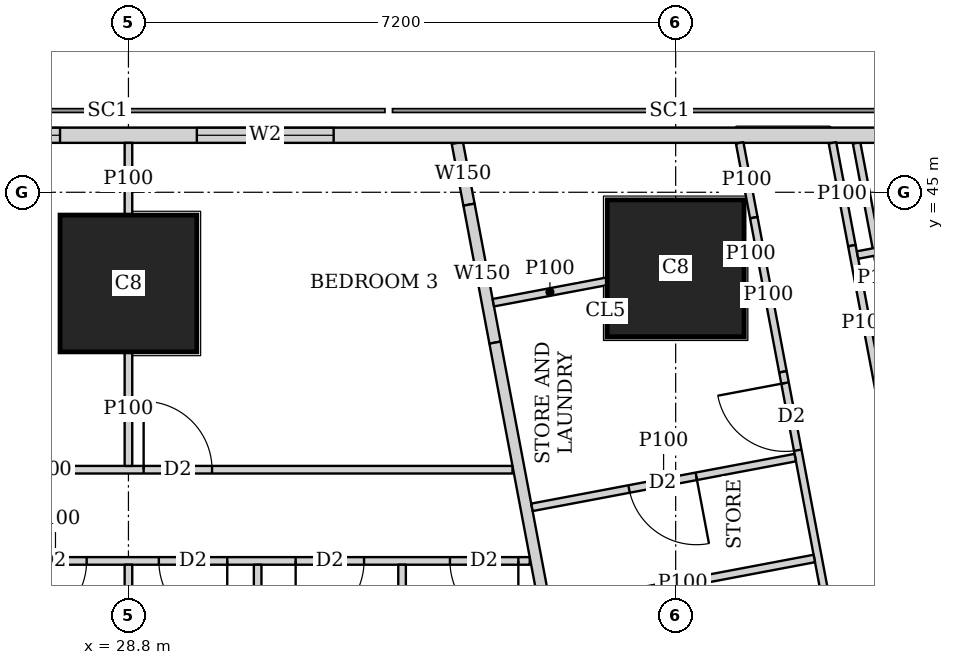
"""IFC4 building model, lengths in metres.
Left out: names, types, materials, properties, quantities, classifications, styles, units other than length and angle.
Written with IfcOpenShell. Run it as: python <this file> out.ifc"""

import sys

from ifc_helpers import new_model, si_unit, direction, frame, frame_2d, origin, origin_2d, place, context, subcontext, project, spatial, rectangle, extrude, element, fill, save


model = new_model("IFC4")
c1 = context("Model", 3, precision=1e-05, world=origin(), true_north=direction((0.0, 1.0)))
c2 = subcontext(c1, "Body", "Model", "MODEL_VIEW")
j1 = project(units=[si_unit("LENGTHUNIT", "METRE"), si_unit("PLANEANGLEUNIT", "RADIAN")], contexts=[c1])
p1 = place(None, origin())
s1 = spatial("IfcSite", under=j1, at=p1, CompositionType="ELEMENT")
p2 = place(p1, origin())
s2 = spatial("IfcBuilding", under=s1, at=p2, CompositionType="ELEMENT")
p3 = place(p2, frame((0.0, 0.0, 139.55)))
s3 = spatial("IfcBuildingStorey", under=s2, at=p3, CompositionType="ELEMENT", Elevation=139.55)
for number, where, z_axis, x_axis in (
    (1, (28.8, 43.8, 0.0), (0.0, 0.0, 1.0), (1.0, 0.0, 0.0)),
    (2, (36.0, 44.0, 0.0), (0.0, 0.0, 1.0), (1.0, 0.0, 0.0)),
):
    element("IfcColumn", number, at=place(p3, frame(where, z_axis=z_axis, x_axis=x_axis)), inside=s3, PredefinedType="COLUMN", context=c2, shape_type="SweptSolid", body=[
        extrude(rectangle(XDim=1.8, YDim=1.8, at=origin_2d()), origin(), (0.0, 0.0, 1.0), 3.75),
    ])
p4 = place(p3, frame((40.106, 45.75, 0.0), z_axis=(0.0, 0.0, 1.0), x_axis=(-1.0, 0.0, 0.0)))
e3 = element("IfcWall", 3, at=p4, inside=s3, PredefinedType="SOLIDWALL", context=c2, shape_type="SweptSolid", body=[
    extrude(rectangle(XDim=37.943, YDim=0.2, at=frame_2d((18.971, 0.0))), origin(), (0.0, 0.0, 1.0), 3.5),
])
p5 = place(p4, frame((8.606, 0.0, 0.9)))
e4 = element("IfcOpeningElement", 4, at=p5, cuts=e3, PredefinedType="OPENING", context=c2, shape_type="SweptSolid", body=[
    extrude(rectangle(XDim=1.8, YDim=1.5, at=frame_2d((0.9, 0.75))), frame((0.0, 0.11, 0.0), z_axis=(0.0, -1.0, 0.0), x_axis=(1.0, 0.0, 0.0)), (0.0, 0.0, 1.0), 0.22),
])
p6 = place(p4, frame((12.206, 0.0, 0.9)))
e5 = element("IfcOpeningElement", 5, at=p6, cuts=e3, PredefinedType="OPENING", context=c2, shape_type="SweptSolid", body=[
    extrude(rectangle(XDim=1.8, YDim=1.5, at=frame_2d((0.9, 0.75))), frame((0.0, 0.11, 0.0), z_axis=(0.0, -1.0, 0.0), x_axis=(1.0, 0.0, 0.0)), (0.0, 0.0, 1.0), 0.22),
])
p7 = place(p4, frame((15.806, 0.0, 0.9)))
e6 = element("IfcOpeningElement", 6, at=p7, cuts=e3, PredefinedType="OPENING", context=c2, shape_type="SweptSolid", body=[
    extrude(rectangle(XDim=1.8, YDim=1.5, at=frame_2d((0.9, 0.75))), frame((0.0, 0.11, 0.0), z_axis=(0.0, -1.0, 0.0), x_axis=(1.0, 0.0, 0.0)), (0.0, 0.0, 1.0), 0.22),
])
p8 = place(p4, frame((19.406, 0.0, 0.9)))
e7 = element("IfcOpeningElement", 7, at=p8, cuts=e3, PredefinedType="OPENING", context=c2, shape_type="SweptSolid", body=[
    extrude(rectangle(XDim=1.8, YDim=1.5, at=frame_2d((0.9, 0.75))), frame((0.0, 0.11, 0.0), z_axis=(0.0, -1.0, 0.0), x_axis=(1.0, 0.0, 0.0)), (0.0, 0.0, 1.0), 0.22),
])
p9 = place(p4, frame((23.006, 0.0, 0.9)))
e8 = element("IfcOpeningElement", 8, at=p9, cuts=e3, PredefinedType="OPENING", context=c2, shape_type="SweptSolid", body=[
    extrude(rectangle(XDim=1.8, YDim=1.5, at=frame_2d((0.9, 0.75))), frame((0.0, 0.11, 0.0), z_axis=(0.0, -1.0, 0.0), x_axis=(1.0, 0.0, 0.0)), (0.0, 0.0, 1.0), 0.22),
])
p10 = place(p4, frame((26.606, 0.0, 0.9)))
e9 = element("IfcOpeningElement", 9, at=p10, cuts=e3, PredefinedType="OPENING", context=c2, shape_type="SweptSolid", body=[
    extrude(rectangle(XDim=1.8, YDim=1.5, at=frame_2d((0.9, 0.75))), frame((0.0, 0.11, 0.0), z_axis=(0.0, -1.0, 0.0), x_axis=(1.0, 0.0, 0.0)), (0.0, 0.0, 1.0), 0.22),
])
p11 = place(p3, frame((33.127, 45.65, 0.0), z_axis=(0.0, 0.0, 1.0), x_axis=(0.186176514576, -0.982516313056, 0.0)))
e10 = element("IfcWall", 10, at=p11, inside=s3, PredefinedType="SOLIDWALL", context=c2, shape_type="SweptSolid", body=[
    extrude(rectangle(XDim=0.827, YDim=0.15, at=frame_2d((0.414, 0.0))), origin(), (0.0, 0.0, 1.0), 3.5),
])
p12 = place(p3, frame((33.281, 44.837, 0.0), z_axis=(0.0, 0.0, 1.0), x_axis=(0.185198323004, -0.982701165745, 0.0)))
e11 = element("IfcWall", 11, at=p12, inside=s3, PredefinedType="SOLIDWALL", context=c2, shape_type="SweptSolid", body=[
    extrude(rectangle(XDim=1.847, YDim=0.15, at=frame_2d((0.923, 0.0))), origin(), (0.0, 0.0, 1.0), 2.1),
])
p13 = place(p3, frame((33.623, 43.022, 0.0), z_axis=(0.0, 0.0, 1.0), x_axis=(0.185596841028, -0.98262597798, 0.0)))
e12 = element("IfcWall", 12, at=p13, inside=s3, PredefinedType="SOLIDWALL", context=c2, shape_type="SweptSolid", body=[
    extrude(rectangle(XDim=41.66, YDim=0.15, at=frame_2d((20.83, 0.0))), origin(), (0.0, 0.0, 1.0), 2.5),
])
p14 = place(p13, frame((20.242, 0.0, 0.0)))
e13 = element("IfcOpeningElement", 13, at=p14, cuts=e12, PredefinedType="OPENING", context=c2, shape_type="SweptSolid", body=[
    extrude(rectangle(XDim=1.0, YDim=2.1, at=frame_2d((0.5, 1.05))), frame((0.0, 0.085, 0.0), z_axis=(0.0, -1.0, 0.0), x_axis=(1.0, 0.0, 0.0)), (0.0, 0.0, 1.0), 0.17),
])
p15 = place(p13, frame((24.714, 0.0, 0.0)))
e14 = element("IfcOpeningElement", 14, at=p15, cuts=e12, PredefinedType="OPENING", context=c2, shape_type="SweptSolid", body=[
    extrude(rectangle(XDim=1.0, YDim=2.1, at=frame_2d((0.5, 1.05))), frame((0.0, 0.085, 0.0), z_axis=(0.0, -1.0, 0.0), x_axis=(1.0, 0.0, 0.0)), (0.0, 0.0, 1.0), 0.17),
])
p16 = place(p13, frame((31.206, 0.0, 0.0)))
e15 = element("IfcOpeningElement", 15, at=p16, cuts=e12, PredefinedType="OPENING", context=c2, shape_type="SweptSolid", body=[
    extrude(rectangle(XDim=1.0, YDim=2.1, at=frame_2d((0.5, 1.05))), frame((0.0, 0.085, 0.0), z_axis=(0.0, -1.0, 0.0), x_axis=(1.0, 0.0, 0.0)), (0.0, 0.0, 1.0), 0.17),
])
p17 = place(p3, frame((39.054, 42.085, 0.0), z_axis=(0.0, 0.0, 1.0), x_axis=(-0.185791584218, 0.982589175207, 0.0)))
e16 = element("IfcWall", 16, at=p17, inside=s3, PredefinedType="PARTITIONING", context=c2, shape_type="SweptSolid", body=[
    extrude(rectangle(XDim=3.628, YDim=0.1, at=frame_2d((1.814, 0.0))), origin(), (0.0, 0.0, 1.0), 2.1),
])
p18 = place(p3, frame((38.063, 45.65, 0.0), z_axis=(0.0, 0.0, 1.0), x_axis=(0.185456359766, -0.982652501458, 0.0)))
e17 = element("IfcWall", 17, at=p18, inside=s3, PredefinedType="PARTITIONING", context=c2, shape_type="SweptSolid", body=[
    extrude(rectangle(XDim=1.376, YDim=0.1, at=frame_2d((0.688, 0.0))), origin(), (0.0, 0.0, 1.0), 3.5),
])
p19 = place(p3, frame((38.318, 44.298, 0.0), z_axis=(0.0, 0.0, 1.0), x_axis=(0.185481135188, -0.982647825261, 0.0)))
e18 = element("IfcWall", 18, at=p19, inside=s3, PredefinedType="PARTITIONING", context=c2, shape_type="SweptSolid", body=[
    extrude(rectangle(XDim=2.064, YDim=0.1, at=frame_2d((1.032, 0.0))), origin(), (0.0, 0.0, 1.0), 2.1),
])
p20 = place(p3, frame((36.842, 45.65, 0.0), z_axis=(0.0, 0.0, 1.0), x_axis=(0.185789875365, -0.982589498322, 0.0)))
e19 = element("IfcWall", 19, at=p20, inside=s3, PredefinedType="PARTITIONING", context=c2, shape_type="SweptSolid", body=[
    extrude(rectangle(XDim=1.001, YDim=0.1, at=frame_2d((0.5, 0.0))), origin(), (0.0, 0.0, 1.0), 3.5),
])
p21 = place(p3, frame((37.028, 44.666, 0.0), z_axis=(0.0, 0.0, 1.0), x_axis=(0.185481135188, -0.982647825261, 0.0)))
e20 = element("IfcWall", 20, at=p21, inside=s3, PredefinedType="PARTITIONING", context=c2, shape_type="SweptSolid", body=[
    extrude(rectangle(XDim=2.064, YDim=0.1, at=frame_2d((1.032, 0.0))), origin(), (0.0, 0.0, 1.0), 2.1),
])
p22 = place(p3, frame((37.411, 42.638, 0.0), z_axis=(0.0, 0.0, 1.0), x_axis=(0.185555586706, -0.982633769134, 0.0)))
e21 = element("IfcWall", 21, at=p22, inside=s3, PredefinedType="PARTITIONING", context=c2, shape_type="SweptSolid", body=[
    extrude(rectangle(XDim=17.704, YDim=0.1, at=frame_2d((8.852, 0.0))), origin(), (0.0, 0.0, 1.0), 2.5),
])
p23 = place(p22, frame((16.28, 0.0, 0.0)))
e22 = element("IfcOpeningElement", 22, at=p23, cuts=e21, PredefinedType="OPENING", context=c2, shape_type="SweptSolid", body=[
    extrude(rectangle(XDim=0.9, YDim=2.1, at=frame_2d((0.45, 1.05))), frame((0.0, 0.06, 0.0), z_axis=(0.0, -1.0, 0.0), x_axis=(1.0, 0.0, 0.0)), (0.0, 0.0, 1.0), 0.12),
])
p24 = place(p22, frame((12.688, 0.0, 0.0)))
e23 = element("IfcOpeningElement", 23, at=p24, cuts=e21, PredefinedType="OPENING", context=c2, shape_type="SweptSolid", body=[
    extrude(rectangle(XDim=0.9, YDim=2.1, at=frame_2d((0.45, 1.05))), frame((0.0, 0.06, 0.0), z_axis=(0.0, -1.0, 0.0), x_axis=(1.0, 0.0, 0.0)), (0.0, 0.0, 1.0), 0.12),
])
p25 = place(p22, frame((8.822, 0.0, 0.0)))
e24 = element("IfcOpeningElement", 24, at=p25, cuts=e21, PredefinedType="OPENING", context=c2, shape_type="SweptSolid", body=[
    extrude(rectangle(XDim=0.9, YDim=2.1, at=frame_2d((0.45, 1.05))), frame((0.0, 0.06, 0.0), z_axis=(0.0, -1.0, 0.0), x_axis=(1.0, 0.0, 0.0)), (0.0, 0.0, 1.0), 0.12),
])
p26 = place(p22, frame((3.188, 0.0, 0.0)))
e25 = element("IfcOpeningElement", 25, at=p26, cuts=e21, PredefinedType="OPENING", context=c2, shape_type="SweptSolid", body=[
    extrude(rectangle(XDim=0.9, YDim=2.1, at=frame_2d((0.45, 1.05))), frame((0.0, 0.06, 0.0), z_axis=(0.0, -1.0, 0.0), x_axis=(1.0, 0.0, 0.0)), (0.0, 0.0, 1.0), 0.12),
])
p27 = place(p22, frame((0.15, 0.0, 0.0)))
e26 = element("IfcOpeningElement", 26, at=p27, cuts=e21, PredefinedType="OPENING", context=c2, shape_type="SweptSolid", body=[
    extrude(rectangle(XDim=0.9, YDim=2.1, at=frame_2d((0.45, 1.05))), frame((0.0, 0.06, 0.0), z_axis=(0.0, -1.0, 0.0), x_axis=(1.0, 0.0, 0.0)), (0.0, 0.0, 1.0), 0.12),
])
p28 = place(p22, frame((14.371, 0.0, 0.0)))
e27 = element("IfcOpeningElement", 27, at=p28, cuts=e21, PredefinedType="OPENING", context=c2, shape_type="SweptSolid", body=[
    extrude(rectangle(XDim=0.9, YDim=2.1, at=frame_2d((0.45, 1.05))), frame((0.0, 0.06, 0.0), z_axis=(0.0, -1.0, 0.0), x_axis=(1.0, 0.0, 0.0)), (0.0, 0.0, 1.0), 0.12),
])
p29 = place(p22, frame((10.78, 0.0, 0.0)))
e28 = element("IfcOpeningElement", 28, at=p29, cuts=e21, PredefinedType="OPENING", context=c2, shape_type="SweptSolid", body=[
    extrude(rectangle(XDim=0.9, YDim=2.1, at=frame_2d((0.45, 1.05))), frame((0.0, 0.06, 0.0), z_axis=(0.0, -1.0, 0.0), x_axis=(1.0, 0.0, 0.0)), (0.0, 0.0, 1.0), 0.12),
])
p30 = place(p22, frame((6.154, 0.0, 0.0)))
e29 = element("IfcOpeningElement", 29, at=p30, cuts=e21, PredefinedType="OPENING", context=c2, shape_type="SweptSolid", body=[
    extrude(rectangle(XDim=0.9, YDim=2.1, at=frame_2d((0.45, 1.05))), frame((0.0, 0.06, 0.0), z_axis=(0.0, -1.0, 0.0), x_axis=(1.0, 0.0, 0.0)), (0.0, 0.0, 1.0), 0.12),
])
p31 = place(p3, frame((41.968, 44.85, 0.0), z_axis=(0.0, 0.0, 1.0), x_axis=(-0.98258614234, -0.185807623311, 0.0)))
e30 = element("IfcWall", 30, at=p31, inside=s3, PredefinedType="PARTITIONING", context=c2, shape_type="SweptSolid", body=[
    extrude(rectangle(XDim=3.638, YDim=0.1, at=frame_2d((1.819, 0.0))), origin(), (0.0, 0.0, 1.0), 2.1),
])
p32 = place(p3, frame((37.065, 44.201, 0.0), z_axis=(0.0, 0.0, 1.0), x_axis=(-0.983168876381, -0.182699098288, 0.0)))
e31 = element("IfcWall", 31, at=p32, inside=s3, PredefinedType="PARTITIONING", context=c2, shape_type="SweptSolid", body=[
    extrude(rectangle(XDim=0.158, YDim=0.1, at=frame_2d((0.079, 0.0))), origin(), (0.0, 0.0, 1.0), 2.1),
])
p33 = place(p3, frame((35.09, 43.828, 0.0), z_axis=(0.0, 0.0, 1.0), x_axis=(-0.982683801717, -0.185290436461, 0.0)))
e32 = element("IfcWall", 32, at=p33, inside=s3, PredefinedType="PARTITIONING", context=c2, shape_type="SweptSolid", body=[
    extrude(rectangle(XDim=1.515, YDim=0.1, at=frame_2d((0.758, 0.0))), origin(), (0.0, 0.0, 1.0), 2.1),
])
p34 = place(p3, frame((37.824, 40.182, 0.0), z_axis=(0.0, 0.0, 1.0), x_axis=(-0.982648794755, -0.185475998897, 0.0)))
e33 = element("IfcWall", 33, at=p34, inside=s3, PredefinedType="PARTITIONING", context=c2, shape_type="SweptSolid", body=[
    extrude(rectangle(XDim=3.525, YDim=0.1, at=frame_2d((1.763, 0.0))), origin(), (0.0, 0.0, 1.0), 3.5),
])
p35 = place(p3, frame((21.6, 41.35, 0.0), z_axis=(0.0, 0.0, 1.0), x_axis=(1.0, 0.0, 0.0)))
e34 = element("IfcWall", 34, at=p35, inside=s3, PredefinedType="PARTITIONING", context=c2, shape_type="SweptSolid", body=[
    extrude(rectangle(XDim=12.253, YDim=0.1, at=frame_2d((6.126, 0.0))), origin(), (0.0, 0.0, 1.0), 3.5),
])
p36 = place(p35, frame((0.2, 0.0, 0.0)))
e35 = element("IfcOpeningElement", 35, at=p36, cuts=e34, PredefinedType="OPENING", context=c2, shape_type="SweptSolid", body=[
    extrude(rectangle(XDim=0.9, YDim=2.1, at=frame_2d((0.45, 1.05))), frame((0.0, 0.06, 0.0), z_axis=(0.0, -1.0, 0.0), x_axis=(1.0, 0.0, 0.0)), (0.0, 0.0, 1.0), 0.12),
])
p37 = place(p35, frame((3.8, 0.0, 0.0)))
e36 = element("IfcOpeningElement", 36, at=p37, cuts=e34, PredefinedType="OPENING", context=c2, shape_type="SweptSolid", body=[
    extrude(rectangle(XDim=0.9, YDim=2.1, at=frame_2d((0.45, 1.05))), frame((0.0, 0.06, 0.0), z_axis=(0.0, -1.0, 0.0), x_axis=(1.0, 0.0, 0.0)), (0.0, 0.0, 1.0), 0.12),
])
p38 = place(p35, frame((7.4, 0.0, 0.0)))
e37 = element("IfcOpeningElement", 37, at=p38, cuts=e34, PredefinedType="OPENING", context=c2, shape_type="SweptSolid", body=[
    extrude(rectangle(XDim=0.9, YDim=2.1, at=frame_2d((0.45, 1.05))), frame((0.0, 0.06, 0.0), z_axis=(0.0, -1.0, 0.0), x_axis=(1.0, 0.0, 0.0)), (0.0, 0.0, 1.0), 0.12),
])
p39 = place(p3, frame((21.6, 40.15, 0.0), z_axis=(0.0, 0.0, 1.0), x_axis=(1.0, 0.0, 0.0)))
e38 = element("IfcWall", 38, at=p39, inside=s3, PredefinedType="PARTITIONING", context=c2, shape_type="SweptSolid", body=[
    extrude(rectangle(XDim=12.48, YDim=0.1, at=frame_2d((6.24, 0.0))), origin(), (0.0, 0.0, 1.0), 3.5),
])
p40 = place(p39, frame((0.575, 0.0, 0.0)))
e39 = element("IfcOpeningElement", 39, at=p40, cuts=e38, PredefinedType="OPENING", context=c2, shape_type="SweptSolid", body=[
    extrude(rectangle(XDim=0.9, YDim=2.1, at=frame_2d((0.45, 1.05))), frame((0.0, 0.06, 0.0), z_axis=(0.0, -1.0, 0.0), x_axis=(1.0, 0.0, 0.0)), (0.0, 0.0, 1.0), 0.12),
])
p41 = place(p39, frame((3.95, 0.0, 0.0)))
e40 = element("IfcOpeningElement", 40, at=p41, cuts=e38, PredefinedType="OPENING", context=c2, shape_type="SweptSolid", body=[
    extrude(rectangle(XDim=0.9, YDim=2.1, at=frame_2d((0.45, 1.05))), frame((0.0, 0.06, 0.0), z_axis=(0.0, -1.0, 0.0), x_axis=(1.0, 0.0, 0.0)), (0.0, 0.0, 1.0), 0.12),
])
p42 = place(p39, frame((7.6, 0.0, 0.0)))
e41 = element("IfcOpeningElement", 41, at=p42, cuts=e38, PredefinedType="OPENING", context=c2, shape_type="SweptSolid", body=[
    extrude(rectangle(XDim=0.9, YDim=2.1, at=frame_2d((0.45, 1.05))), frame((0.0, 0.06, 0.0), z_axis=(0.0, -1.0, 0.0), x_axis=(1.0, 0.0, 0.0)), (0.0, 0.0, 1.0), 0.12),
])
p43 = place(p39, frame((11.43, 0.0, 0.0)))
e42 = element("IfcOpeningElement", 42, at=p43, cuts=e38, PredefinedType="OPENING", context=c2, shape_type="SweptSolid", body=[
    extrude(rectangle(XDim=0.9, YDim=2.1, at=frame_2d((0.45, 1.05))), frame((0.0, 0.06, 0.0), z_axis=(0.0, -1.0, 0.0), x_axis=(1.0, 0.0, 0.0)), (0.0, 0.0, 1.0), 0.12),
])
p44 = place(p39, frame((2.375, 0.0, 0.0)))
e43 = element("IfcOpeningElement", 43, at=p44, cuts=e38, PredefinedType="OPENING", context=c2, shape_type="SweptSolid", body=[
    extrude(rectangle(XDim=0.9, YDim=2.1, at=frame_2d((0.45, 1.05))), frame((0.0, 0.06, 0.0), z_axis=(0.0, -1.0, 0.0), x_axis=(1.0, 0.0, 0.0)), (0.0, 0.0, 1.0), 0.12),
])
p45 = place(p39, frame((5.75, 0.0, 0.0)))
e44 = element("IfcOpeningElement", 44, at=p45, cuts=e38, PredefinedType="OPENING", context=c2, shape_type="SweptSolid", body=[
    extrude(rectangle(XDim=0.9, YDim=2.1, at=frame_2d((0.45, 1.05))), frame((0.0, 0.06, 0.0), z_axis=(0.0, -1.0, 0.0), x_axis=(1.0, 0.0, 0.0)), (0.0, 0.0, 1.0), 0.12),
])
p46 = place(p39, frame((9.4, 0.0, 0.0)))
e45 = element("IfcOpeningElement", 45, at=p46, cuts=e38, PredefinedType="OPENING", context=c2, shape_type="SweptSolid", body=[
    extrude(rectangle(XDim=0.9, YDim=2.1, at=frame_2d((0.45, 1.05))), frame((0.0, 0.06, 0.0), z_axis=(0.0, -1.0, 0.0), x_axis=(1.0, 0.0, 0.0)), (0.0, 0.0, 1.0), 0.12),
])
p47 = place(p3, frame((28.8, 41.4, 0.0), z_axis=(0.0, 0.0, 1.0), x_axis=(0.0, 1.0, 0.0)))
e46 = element("IfcWall", 46, at=p47, inside=s3, PredefinedType="PARTITIONING", context=c2, shape_type="SweptSolid", body=[
    extrude(rectangle(XDim=1.499, YDim=0.1, at=frame_2d((0.75, 0.0))), origin(), (0.0, 0.0, 1.0), 3.5),
])
p48 = place(p3, frame((28.8, 44.701, 0.0), z_axis=(0.0, 0.0, 1.0), x_axis=(0.0, 1.0, 0.0)))
e47 = element("IfcWall", 47, at=p48, inside=s3, PredefinedType="PARTITIONING", context=c2, shape_type="SweptSolid", body=[
    extrude(rectangle(XDim=0.949, YDim=0.1, at=frame_2d((0.475, 0.0))), origin(), (0.0, 0.0, 1.0), 3.5),
])
p49 = place(p3, frame((28.8, 38.251, 0.0), z_axis=(0.0, 0.0, 1.0), x_axis=(0.0, 1.0, 0.0)))
e48 = element("IfcWall", 48, at=p49, inside=s3, PredefinedType="PARTITIONING", context=c2, shape_type="SweptSolid", body=[
    extrude(rectangle(XDim=1.849, YDim=0.1, at=frame_2d((0.925, 0.0))), origin(), (0.0, 0.0, 1.0), 3.5),
])
for number, where, z_axis, x_axis in (
    (49, (32.4, 36.575, 0.0), (0.0, 0.0, 1.0), (0.0, 1.0, 0.0)),
    (50, (30.5, 36.575, 0.0), (0.0, 0.0, 1.0), (0.0, 1.0, 0.0)),
):
    element("IfcWall", number, at=place(p3, frame(where, z_axis=z_axis, x_axis=x_axis)), inside=s3, PredefinedType="PARTITIONING", context=c2, shape_type="SweptSolid", body=[
        extrude(rectangle(XDim=3.525, YDim=0.1, at=frame_2d((1.763, 0.0))), origin(), (0.0, 0.0, 1.0), 3.5),
    ])
p50 = place(p3, frame((37.573, 41.509, 0.0), z_axis=(0.0, 0.0, 1.0), x_axis=(-0.982638553676, -0.185530247748, 0.0)))
e51 = element("IfcWall", 51, at=p50, inside=s3, PredefinedType="PARTITIONING", context=c2, shape_type="SweptSolid", body=[
    extrude(rectangle(XDim=3.525, YDim=0.1, at=frame_2d((1.763, 0.0))), origin(), (0.0, 0.0, 1.0), 3.5),
])
p51 = place(p50, frame((1.325, 0.0, 0.0)))
e52 = element("IfcOpeningElement", 52, at=p51, cuts=e51, PredefinedType="OPENING", context=c2, shape_type="SweptSolid", body=[
    extrude(rectangle(XDim=0.9, YDim=2.1, at=frame_2d((0.45, 1.05))), frame((0.0, 0.06, 0.0), z_axis=(0.0, -1.0, 0.0), x_axis=(1.0, 0.0, 0.0)), (0.0, 0.0, 1.0), 0.12),
])
p52 = place(p5, origin())
e53 = element("IfcWindow", 53, at=p52, inside=s3, PartitioningType="SINGLE_PANEL", PredefinedType="WINDOW", context=c2, shape_type="SweptSolid", body=[
    extrude(rectangle(XDim=1.8, YDim=1.5, at=frame_2d((0.9, 0.75))), frame((0.0, 0.03, 0.0), z_axis=(0.0, -1.0, 0.0), x_axis=(1.0, 0.0, 0.0)), (0.0, 0.0, 1.0), 0.06),
])
fill(e4, e53)
p53 = place(p6, origin())
e54 = element("IfcWindow", 54, at=p53, inside=s3, PartitioningType="SINGLE_PANEL", PredefinedType="WINDOW", context=c2, shape_type="SweptSolid", body=[
    extrude(rectangle(XDim=1.8, YDim=1.5, at=frame_2d((0.9, 0.75))), frame((0.0, 0.03, 0.0), z_axis=(0.0, -1.0, 0.0), x_axis=(1.0, 0.0, 0.0)), (0.0, 0.0, 1.0), 0.06),
])
fill(e5, e54)
p54 = place(p27, origin())
e55 = element("IfcDoor", 55, at=p54, inside=s3, OperationType="SINGLE_SWING_RIGHT", PredefinedType="DOOR", context=c2, shape_type="SweptSolid", body=[
    extrude(rectangle(XDim=0.9, YDim=2.1, at=frame_2d((0.45, 1.05))), frame((0.0, 0.025, 0.0), z_axis=(0.0, -1.0, 0.0), x_axis=(1.0, 0.0, 0.0)), (0.0, 0.0, 1.0), 0.05),
])
fill(e26, e55)
p55 = place(p38, origin())
e56 = element("IfcDoor", 56, at=p55, inside=s3, OperationType="SINGLE_SWING_LEFT", PredefinedType="DOOR", context=c2, shape_type="SweptSolid", body=[
    extrude(rectangle(XDim=0.9, YDim=2.1, at=frame_2d((0.45, 1.05))), frame((0.0, 0.025, 0.0), z_axis=(0.0, -1.0, 0.0), x_axis=(1.0, 0.0, 0.0)), (0.0, 0.0, 1.0), 0.05),
])
fill(e37, e56)
p56 = place(p42, origin())
e57 = element("IfcDoor", 57, at=p56, inside=s3, OperationType="SINGLE_SWING_LEFT", PredefinedType="DOOR", context=c2, shape_type="SweptSolid", body=[
    extrude(rectangle(XDim=0.9, YDim=2.1, at=frame_2d((0.45, 1.05))), frame((0.0, 0.025, 0.0), z_axis=(0.0, -1.0, 0.0), x_axis=(1.0, 0.0, 0.0)), (0.0, 0.0, 1.0), 0.05),
])
fill(e41, e57)
p57 = place(p43, origin())
e58 = element("IfcDoor", 58, at=p57, inside=s3, OperationType="SINGLE_SWING_LEFT", PredefinedType="DOOR", context=c2, shape_type="SweptSolid", body=[
    extrude(rectangle(XDim=0.9, YDim=2.1, at=frame_2d((0.45, 1.05))), frame((0.0, 0.025, 0.0), z_axis=(0.0, -1.0, 0.0), x_axis=(1.0, 0.0, 0.0)), (0.0, 0.0, 1.0), 0.05),
])
fill(e42, e58)
p58 = place(p45, origin())
e59 = element("IfcDoor", 59, at=p58, inside=s3, OperationType="SINGLE_SWING_RIGHT", PredefinedType="DOOR", context=c2, shape_type="SweptSolid", body=[
    extrude(rectangle(XDim=0.9, YDim=2.1, at=frame_2d((0.45, 1.05))), frame((0.0, 0.025, 0.0), z_axis=(0.0, -1.0, 0.0), x_axis=(1.0, 0.0, 0.0)), (0.0, 0.0, 1.0), 0.05),
])
fill(e44, e59)
p59 = place(p46, origin())
e60 = element("IfcDoor", 60, at=p59, inside=s3, OperationType="SINGLE_SWING_RIGHT", PredefinedType="DOOR", context=c2, shape_type="SweptSolid", body=[
    extrude(rectangle(XDim=0.9, YDim=2.1, at=frame_2d((0.45, 1.05))), frame((0.0, 0.025, 0.0), z_axis=(0.0, -1.0, 0.0), x_axis=(1.0, 0.0, 0.0)), (0.0, 0.0, 1.0), 0.05),
])
fill(e45, e60)
p60 = place(p51, origin())
e61 = element("IfcDoor", 61, at=p60, inside=s3, OperationType="SINGLE_SWING_LEFT", PredefinedType="DOOR", context=c2, shape_type="SweptSolid", body=[
    extrude(rectangle(XDim=0.9, YDim=2.1, at=frame_2d((0.45, 1.05))), frame((0.0, 0.025, 0.0), z_axis=(0.0, -1.0, 0.0), x_axis=(1.0, 0.0, 0.0)), (0.0, 0.0, 1.0), 0.05),
])
fill(e52, e61)
save(model, sys.argv[1])
